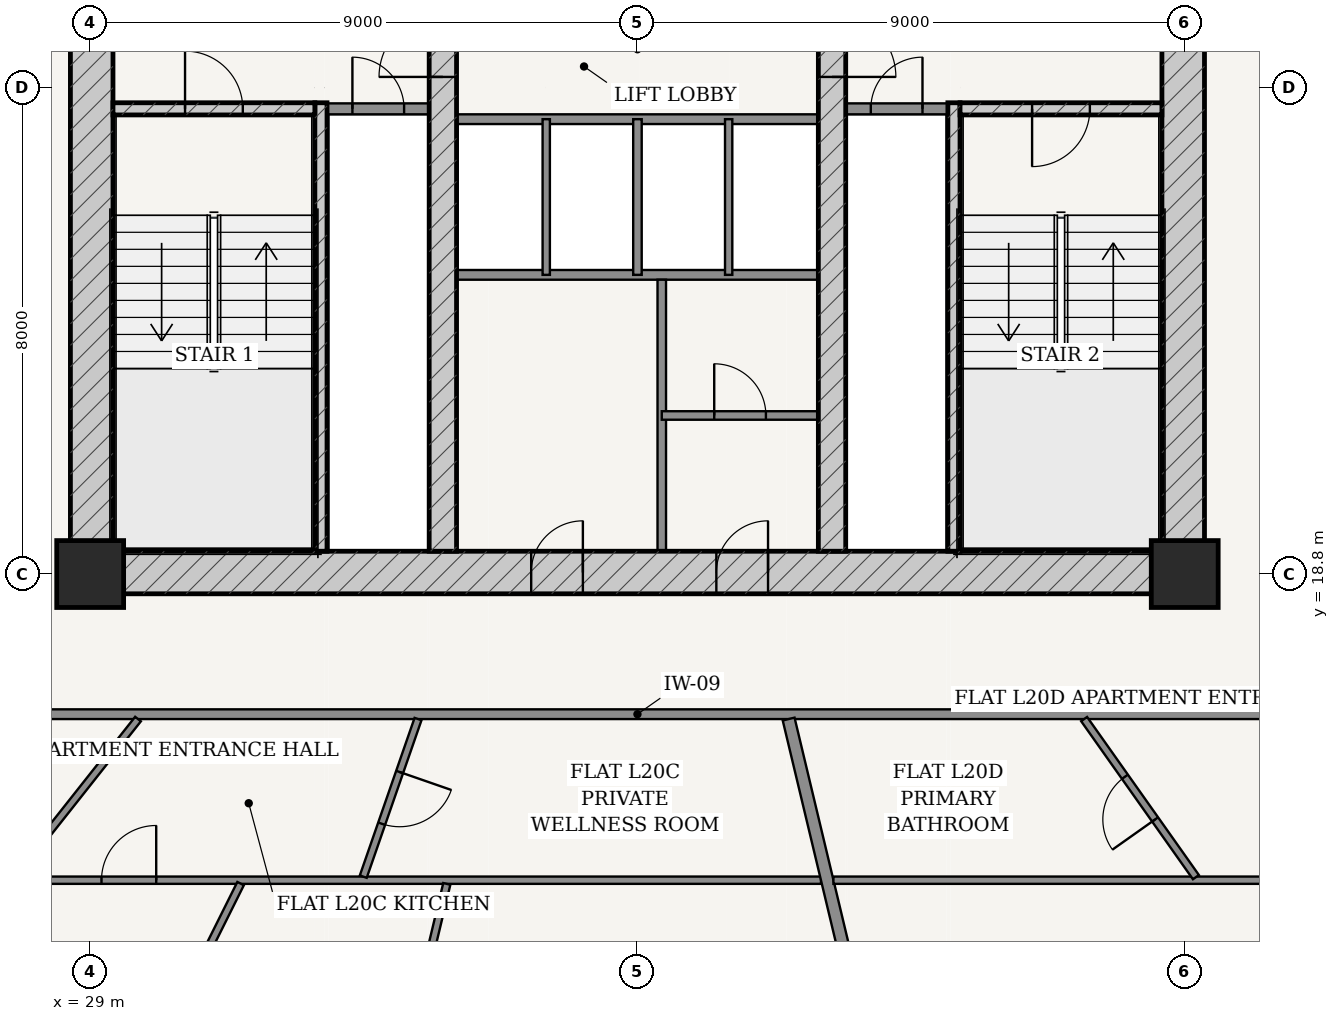
"""IFC4 building model, lengths in metres.
Left out: names, types, materials, properties, quantities, classifications, styles, units other than length and angle.
Written with IfcOpenShell. Run it as: python <this file> out.ifc"""

import sys

from ifc_helpers import new_model, si_unit, direction, frame, frame_2d, origin, origin_2d, place, context, subcontext, project, spatial, rectangle, extrude, source, transform, mapped, element, fill, save


model = new_model("IFC4")
c1 = context("Model", 3, precision=1e-05, world=origin(), true_north=direction((-0.2419218956, 0.970295726276)))
c2 = subcontext(c1, "Body", "Model", "MODEL_VIEW")
j1 = project(units=[si_unit("LENGTHUNIT", "METRE"), si_unit("PLANEANGLEUNIT", "RADIAN")], contexts=[c1])
p1 = place(None, origin())
s1 = spatial("IfcSite", under=j1, at=p1, CompositionType="ELEMENT")
p2 = place(p1, origin())
s2 = spatial("IfcBuilding", under=s1, at=p2, CompositionType="ELEMENT")
p3 = place(p2, frame((0.0, 0.0, 79.8)))
s3 = spatial("IfcBuildingStorey", under=s2, at=p3, CompositionType="ELEMENT", Elevation=79.8)
for number, where, z_axis, x_axis in (
    (1, (29.0, 18.8, 0.0), (0.0, 0.0, 1.0), (1.0, 0.0, 0.0)),
    (2, (47.0, 18.8, 0.0), (0.0, 0.0, 1.0), (1.0, 0.0, 0.0)),
):
    element("IfcColumn", number, at=place(p3, frame(where, z_axis=z_axis, x_axis=x_axis)), inside=s3, PredefinedType="COLUMN", context=c2, shape_type="SweptSolid", body=[
        extrude(rectangle(XDim=1.1, YDim=1.1, at=origin_2d()), origin(), (0.0, 0.0, 1.0), 3.6),
    ])
p4 = place(p3, frame((28.675, 18.825, 0.0), z_axis=(0.0, 0.0, 1.0), x_axis=(1.0, 0.0, 0.0)))
e3 = element("IfcWall", 3, at=p4, inside=s3, PredefinedType="SHEAR", context=c2, shape_type="SweptSolid", body=[
    extrude(rectangle(XDim=18.65, YDim=0.7, at=frame_2d((9.325, 0.0))), origin(), (0.0, 0.0, 1.0), 3.325),
])
p5 = place(p4, frame((7.577, 0.0, 0.0)))
e4 = element("IfcOpeningElement", 4, at=p5, cuts=e3, PredefinedType="OPENING", context=c2, shape_type="SweptSolid", body=[
    extrude(rectangle(XDim=0.85, YDim=2.1, at=frame_2d((0.425, 1.05))), frame((0.0, 0.36, 0.0), z_axis=(0.0, -1.0, 0.0), x_axis=(1.0, 0.0, 0.0)), (0.0, 0.0, 1.0), 0.72),
])
p6 = place(p4, frame((10.623, 0.0, 0.0)))
e5 = element("IfcOpeningElement", 5, at=p6, cuts=e3, PredefinedType="OPENING", context=c2, shape_type="SweptSolid", body=[
    extrude(rectangle(XDim=0.85, YDim=2.1, at=frame_2d((0.425, 1.05))), frame((0.0, 0.36, 0.0), z_axis=(0.0, -1.0, 0.0), x_axis=(1.0, 0.0, 0.0)), (0.0, 0.0, 1.0), 0.72),
])
p7 = place(p3, frame((29.025, 19.175, 0.0), z_axis=(0.0, 0.0, 1.0), x_axis=(0.0, 1.0, 0.0)))
e6 = element("IfcWall", 6, at=p7, inside=s3, PredefinedType="SHEAR", context=c2, shape_type="SweptSolid", body=[
    extrude(rectangle(XDim=15.25, YDim=0.7, at=frame_2d((7.625, 0.0))), origin(), (0.0, 0.0, 1.0), 3.325),
])
p8 = place(p7, frame((9.875, 0.0, 0.0)))
e7 = element("IfcOpeningElement", 7, at=p8, cuts=e6, PredefinedType="OPENING", context=c2, shape_type="SweptSolid", body=[
    extrude(rectangle(XDim=1.5, YDim=2.2, at=frame_2d((0.75, 1.1))), frame((0.0, 0.36, 0.0), z_axis=(0.0, -1.0, 0.0), x_axis=(1.0, 0.0, 0.0)), (0.0, 0.0, 1.0), 0.72),
])
p9 = place(p3, frame((46.975, 19.175, 0.0), z_axis=(0.0, 0.0, 1.0), x_axis=(0.0, 1.0, 0.0)))
e8 = element("IfcWall", 8, at=p9, inside=s3, PredefinedType="SHEAR", context=c2, shape_type="SweptSolid", body=[
    extrude(rectangle(XDim=15.25, YDim=0.7, at=frame_2d((7.625, 0.0))), origin(), (0.0, 0.0, 1.0), 3.325),
])
p10 = place(p9, frame((9.875, 0.0, 0.0)))
e9 = element("IfcOpeningElement", 9, at=p10, cuts=e8, PredefinedType="OPENING", context=c2, shape_type="SweptSolid", body=[
    extrude(rectangle(XDim=1.5, YDim=2.2, at=frame_2d((0.75, 1.1))), frame((0.0, 0.36, 0.0), z_axis=(0.0, -1.0, 0.0), x_axis=(1.0, 0.0, 0.0)), (0.0, 0.0, 1.0), 0.72),
])
p11 = place(p3, frame((32.795, 19.175, 0.0), z_axis=(0.0, 0.0, 1.0), x_axis=(0.0, 1.0, 0.0)))
e10 = element("IfcWall", 10, at=p11, inside=s3, PredefinedType="SOLIDWALL", context=c2, shape_type="SweptSolid", body=[
    extrude(rectangle(XDim=7.375, YDim=0.2, at=frame_2d((3.688, 0.0))), origin(), (0.0, 0.0, 1.0), 3.325),
])
p12 = place(p3, frame((29.375, 26.45, 0.0), z_axis=(0.0, 0.0, 1.0), x_axis=(1.0, 0.0, 0.0)))
e11 = element("IfcWall", 11, at=p12, inside=s3, PredefinedType="SOLIDWALL", context=c2, shape_type="SweptSolid", body=[
    extrude(rectangle(XDim=3.32, YDim=0.2, at=frame_2d((1.66, 0.0))), origin(), (0.0, 0.0, 1.0), 3.325),
])
p13 = place(p12, frame((1.185, 0.0, 0.0)))
e12 = element("IfcOpeningElement", 12, at=p13, cuts=e11, PredefinedType="OPENING", context=c2, shape_type="SweptSolid", body=[
    extrude(rectangle(XDim=0.95, YDim=2.15, at=frame_2d((0.475, 1.075))), frame((0.0, 0.11, 0.0), z_axis=(0.0, -1.0, 0.0), x_axis=(1.0, 0.0, 0.0)), (0.0, 0.0, 1.0), 0.22),
])
p14 = place(p3, frame((43.205, 19.175, 0.0), z_axis=(0.0, 0.0, 1.0), x_axis=(0.0, 1.0, 0.0)))
e13 = element("IfcWall", 13, at=p14, inside=s3, PredefinedType="SOLIDWALL", context=c2, shape_type="SweptSolid", body=[
    extrude(rectangle(XDim=7.375, YDim=0.2, at=frame_2d((3.688, 0.0))), origin(), (0.0, 0.0, 1.0), 3.325),
])
p15 = place(p3, frame((43.305, 26.45, 0.0), z_axis=(0.0, 0.0, 1.0), x_axis=(1.0, 0.0, 0.0)))
e14 = element("IfcWall", 14, at=p15, inside=s3, PredefinedType="SOLIDWALL", context=c2, shape_type="SweptSolid", body=[
    extrude(rectangle(XDim=3.32, YDim=0.2, at=frame_2d((1.66, 0.0))), origin(), (0.0, 0.0, 1.0), 3.325),
])
p16 = place(p15, frame((1.185, 0.0, 0.0)))
e15 = element("IfcOpeningElement", 15, at=p16, cuts=e14, PredefinedType="OPENING", context=c2, shape_type="SweptSolid", body=[
    extrude(rectangle(XDim=0.95, YDim=2.15, at=frame_2d((0.475, 1.075))), frame((0.0, 0.11, 0.0), z_axis=(0.0, -1.0, 0.0), x_axis=(1.0, 0.0, 0.0)), (0.0, 0.0, 1.0), 0.22),
])
p17 = place(p3, frame((34.8, 19.175, 0.0), z_axis=(0.0, 0.0, 1.0), x_axis=(0.0, 1.0, 0.0)))
e16 = element("IfcWall", 16, at=p17, inside=s3, PredefinedType="SHEAR", context=c2, shape_type="SweptSolid", body=[
    extrude(rectangle(XDim=15.25, YDim=0.45, at=frame_2d((7.625, 0.0))), origin(), (0.0, 0.0, 1.0), 3.325),
])
p18 = place(p17, frame((7.8, 0.0, 0.0)))
e17 = element("IfcOpeningElement", 17, at=p18, cuts=e16, PredefinedType="OPENING", context=c2, shape_type="SweptSolid", body=[
    extrude(rectangle(XDim=1.05, YDim=2.15, at=frame_2d((0.525, 1.075))), frame((0.0, 0.235, 0.0), z_axis=(0.0, -1.0, 0.0), x_axis=(1.0, 0.0, 0.0)), (0.0, 0.0, 1.0), 0.47),
])
p19 = place(p3, frame((41.2, 19.175, 0.0), z_axis=(0.0, 0.0, 1.0), x_axis=(0.0, 1.0, 0.0)))
e18 = element("IfcWall", 18, at=p19, inside=s3, PredefinedType="SHEAR", context=c2, shape_type="SweptSolid", body=[
    extrude(rectangle(XDim=15.25, YDim=0.45, at=frame_2d((7.625, 0.0))), origin(), (0.0, 0.0, 1.0), 3.325),
])
p20 = place(p19, frame((7.8, 0.0, 0.0)))
e19 = element("IfcOpeningElement", 19, at=p20, cuts=e18, PredefinedType="OPENING", context=c2, shape_type="SweptSolid", body=[
    extrude(rectangle(XDim=1.05, YDim=2.15, at=frame_2d((0.525, 1.075))), frame((0.0, 0.235, 0.0), z_axis=(0.0, -1.0, 0.0), x_axis=(1.0, 0.0, 0.0)), (0.0, 0.0, 1.0), 0.47),
])
p21 = place(p3, frame((32.9, 26.45, 0.0), z_axis=(0.0, 0.0, 1.0), x_axis=(1.0, 0.0, 0.0)))
e20 = element("IfcWall", 20, at=p21, inside=s3, PredefinedType="PARTITIONING", context=c2, shape_type="SweptSolid", body=[
    extrude(rectangle(XDim=1.675, YDim=0.18, at=frame_2d((0.837, 0.0))), origin(), (0.0, 0.0, 1.0), 3.325),
])
p22 = place(p21, frame((0.413, 0.0, 0.0)))
e21 = element("IfcOpeningElement", 21, at=p22, cuts=e20, PredefinedType="OPENING", context=c2, shape_type="SweptSolid", body=[
    extrude(rectangle(XDim=0.85, YDim=2.1, at=frame_2d((0.425, 1.05))), frame((0.0, 0.1, 0.0), z_axis=(0.0, -1.0, 0.0), x_axis=(1.0, 0.0, 0.0)), (0.0, 0.0, 1.0), 0.2),
])
p23 = place(p3, frame((41.425, 26.45, 0.0), z_axis=(0.0, 0.0, 1.0), x_axis=(1.0, 0.0, 0.0)))
e22 = element("IfcWall", 22, at=p23, inside=s3, PredefinedType="PARTITIONING", context=c2, shape_type="SweptSolid", body=[
    extrude(rectangle(XDim=1.675, YDim=0.18, at=frame_2d((0.837, 0.0))), origin(), (0.0, 0.0, 1.0), 3.325),
])
p24 = place(p23, frame((0.413, 0.0, 0.0)))
e23 = element("IfcOpeningElement", 23, at=p24, cuts=e22, PredefinedType="OPENING", context=c2, shape_type="SweptSolid", body=[
    extrude(rectangle(XDim=0.85, YDim=2.1, at=frame_2d((0.425, 1.05))), frame((0.0, 0.1, 0.0), z_axis=(0.0, -1.0, 0.0), x_axis=(1.0, 0.0, 0.0)), (0.0, 0.0, 1.0), 0.2),
])
for number, where, z_axis, x_axis in (
    (24, (35.025, 26.28, 0.0), (0.0, 0.0, 1.0), (1.0, 0.0, 0.0)),
    (25, (35.025, 23.72, 0.0), (0.0, 0.0, 1.0), (1.0, 0.0, 0.0)),
):
    element("IfcWall", number, at=place(p3, frame(where, z_axis=z_axis, x_axis=x_axis)), inside=s3, PredefinedType="PARTITIONING", context=c2, shape_type="SweptSolid", body=[
        extrude(rectangle(XDim=5.95, YDim=0.16, at=frame_2d((2.975, 0.0))), origin(), (0.0, 0.0, 1.0), 3.325),
    ])
p25 = place(p3, frame((36.5, 23.72, 0.0), z_axis=(0.0, 0.0, 1.0), x_axis=(0.0, 1.0, 0.0)))
e26 = element("IfcWall", 26, at=p25, inside=s3, PredefinedType="PARTITIONING", context=c2, shape_type="SweptSolid", body=[
    extrude(rectangle(XDim=2.56, YDim=0.12, at=frame_2d((1.28, 0.0))), origin(), (0.0, 0.0, 1.0), 3.325),
])
p26 = place(p3, frame((38.0, 23.72, 0.0), z_axis=(0.0, 0.0, 1.0), x_axis=(0.0, 1.0, 0.0)))
e27 = element("IfcWall", 27, at=p26, inside=s3, PredefinedType="PARTITIONING", context=c2, shape_type="SweptSolid", body=[
    extrude(rectangle(XDim=2.56, YDim=0.14, at=frame_2d((1.28, 0.0))), origin(), (0.0, 0.0, 1.0), 3.325),
])
p27 = place(p3, frame((39.5, 23.72, 0.0), z_axis=(0.0, 0.0, 1.0), x_axis=(0.0, 1.0, 0.0)))
e28 = element("IfcWall", 28, at=p27, inside=s3, PredefinedType="PARTITIONING", context=c2, shape_type="SweptSolid", body=[
    extrude(rectangle(XDim=2.56, YDim=0.12, at=frame_2d((1.28, 0.0))), origin(), (0.0, 0.0, 1.0), 3.325),
])
p28 = place(p3, frame((38.4, 19.175, 0.0), z_axis=(0.0, 0.0, 1.0), x_axis=(0.0, 1.0, 0.0)))
e29 = element("IfcWall", 29, at=p28, inside=s3, PredefinedType="PARTITIONING", context=c2, shape_type="SweptSolid", body=[
    extrude(rectangle(XDim=4.465, YDim=0.14, at=frame_2d((2.232, 0.0))), origin(), (0.0, 0.0, 1.0), 3.325),
])
p29 = place(p3, frame((38.4, 21.407, 0.0), z_axis=(0.0, 0.0, 1.0), x_axis=(1.0, 0.0, 0.0)))
e30 = element("IfcWall", 30, at=p29, inside=s3, PredefinedType="PARTITIONING", context=c2, shape_type="SweptSolid", body=[
    extrude(rectangle(XDim=2.575, YDim=0.14, at=frame_2d((1.288, 0.0))), origin(), (0.0, 0.0, 1.0), 3.325),
])
p30 = place(p29, frame((0.863, 0.0, 0.0)))
e31 = element("IfcOpeningElement", 31, at=p30, cuts=e30, PredefinedType="OPENING", context=c2, shape_type="SweptSolid", body=[
    extrude(rectangle(XDim=0.85, YDim=2.1, at=frame_2d((0.425, 1.05))), frame((0.0, 0.08, 0.0), z_axis=(0.0, -1.0, 0.0), x_axis=(1.0, 0.0, 0.0)), (0.0, 0.0, 1.0), 0.16),
])
p31 = place(p3, frame((26.695, 16.495, 0.0), z_axis=(0.0, 0.0, 1.0), x_axis=(1.0, 0.0, 0.0)))
e32 = element("IfcWall", 32, at=p31, inside=s3, PredefinedType="PARTITIONING", context=c2, shape_type="SweptSolid", body=[
    extrude(rectangle(XDim=22.61, YDim=0.16, at=frame_2d((11.305, 0.0))), origin(), (0.0, 0.0, 1.0), 2.767),
])
p32 = place(p3, frame((41.019, 13.765, 0.0), z_axis=(0.0, 0.0, 1.0), x_axis=(-1.0, 0.0, 0.0)))
e33 = element("IfcWall", 33, at=p32, inside=s3, PredefinedType="PARTITIONING", context=c2, shape_type="SweptSolid", body=[
    extrude(rectangle(XDim=17.054, YDim=0.12, at=frame_2d((8.527, 0.0))), origin(), (0.0, 0.0, 1.0), 2.767),
])
p33 = place(p32, frame((10.933, 0.0, 0.0)))
e34 = element("IfcOpeningElement", 34, at=p33, cuts=e33, PredefinedType="OPENING", context=c2, shape_type="SweptSolid", body=[
    extrude(rectangle(XDim=0.9, YDim=2.15, at=frame_2d((0.45, 1.075))), frame((0.0, 0.07, 0.0), z_axis=(0.0, -1.0, 0.0), x_axis=(1.0, 0.0, 0.0)), (0.0, 0.0, 1.0), 0.14),
])
p34 = place(p3, frame((31.474, 13.709, 0.0), z_axis=(0.0, 0.0, 1.0), x_axis=(-0.446179583353, -0.894943450392, 0.0)))
e35 = element("IfcWall", 35, at=p34, inside=s3, PredefinedType="PARTITIONING", context=c2, shape_type="SweptSolid", body=[
    extrude(rectangle(XDim=8.125, YDim=0.12, at=frame_2d((4.062, 0.0))), origin(), (0.0, 0.0, 1.0), 2.767),
])
p35 = place(p34, frame((3.612, 0.0, 0.0)))
e36 = element("IfcOpeningElement", 36, at=p35, cuts=e35, PredefinedType="OPENING", context=c2, shape_type="SweptSolid", body=[
    extrude(rectangle(XDim=0.9, YDim=2.15, at=frame_2d((0.45, 1.075))), frame((0.0, 0.07, 0.0), z_axis=(0.0, -1.0, 0.0), x_axis=(1.0, 0.0, 0.0)), (0.0, 0.0, 1.0), 0.14),
])
p36 = place(p3, frame((34.865, 13.705, 0.0), z_axis=(0.0, 0.0, 1.0), x_axis=(-0.23282725047, -0.97251810854, 0.0)))
e37 = element("IfcWall", 37, at=p36, inside=s3, PredefinedType="PARTITIONING", context=c2, shape_type="SweptSolid", body=[
    extrude(rectangle(XDim=8.715, YDim=0.12, at=frame_2d((4.357, 0.0))), origin(), (0.0, 0.0, 1.0), 2.767),
])
p37 = place(p36, frame((2.831, 0.0, 0.0)))
e38 = element("IfcOpeningElement", 38, at=p37, cuts=e37, PredefinedType="OPENING", context=c2, shape_type="SweptSolid", body=[
    extrude(rectangle(XDim=0.9, YDim=2.15, at=frame_2d((0.45, 1.075))), frame((0.0, 0.07, 0.0), z_axis=(0.0, -1.0, 0.0), x_axis=(1.0, 0.0, 0.0)), (0.0, 0.0, 1.0), 0.14),
])
p38 = place(p3, frame((29.787, 16.415, 0.0), z_axis=(0.0, 0.0, 1.0), x_axis=(-0.62033143471, -0.784339793145, 0.0)))
e39 = element("IfcWall", 39, at=p38, inside=s3, PredefinedType="PARTITIONING", context=c2, shape_type="SweptSolid", body=[
    extrude(rectangle(XDim=3.317, YDim=0.12, at=frame_2d((1.658, 0.0))), origin(), (0.0, 0.0, 1.0), 3.004),
])
p39 = place(p3, frame((34.392, 16.415, 0.0), z_axis=(0.0, 0.0, 1.0), x_axis=(-0.328268661855, -0.94458439837, 0.0)))
e40 = element("IfcWall", 40, at=p39, inside=s3, PredefinedType="PARTITIONING", context=c2, shape_type="SweptSolid", body=[
    extrude(rectangle(XDim=2.744, YDim=0.12, at=frame_2d((1.372, 0.0))), origin(), (0.0, 0.0, 1.0), 3.325),
])
p40 = place(p39, frame((0.922, 0.0, 0.0)))
e41 = element("IfcOpeningElement", 41, at=p40, cuts=e40, PredefinedType="OPENING", context=c2, shape_type="SweptSolid", body=[
    extrude(rectangle(XDim=0.9, YDim=2.15, at=frame_2d((0.45, 1.075))), frame((0.0, 0.07, 0.0), z_axis=(0.0, -1.0, 0.0), x_axis=(1.0, 0.0, 0.0)), (0.0, 0.0, 1.0), 0.14),
])
p41 = place(p3, frame((40.486, 16.415, 0.0), z_axis=(0.0, 0.0, 1.0), x_axis=(0.232829417917, -0.972517589636, 0.0)))
e42 = element("IfcWall", 42, at=p41, inside=s3, PredefinedType="PARTITIONING", context=c2, shape_type="SweptSolid", body=[
    extrude(rectangle(XDim=11.502, YDim=0.2, at=frame_2d((5.751, 0.0))), origin(), (0.0, 0.0, 1.0), 2.767),
])
p42 = place(p3, frame((52.035, 13.765, 0.0), z_axis=(0.0, 0.0, 1.0), x_axis=(-1.0, 0.0, 0.0)))
e43 = element("IfcWall", 43, at=p42, inside=s3, PredefinedType="PARTITIONING", context=c2, shape_type="SweptSolid", body=[
    extrude(rectangle(XDim=10.812, YDim=0.12, at=frame_2d((5.406, 0.0))), origin(), (0.0, 0.0, 1.0), 2.767),
])
p43 = place(p42, frame((2.145, 0.0, 0.0)))
e44 = element("IfcOpeningElement", 44, at=p43, cuts=e43, PredefinedType="OPENING", context=c2, shape_type="SweptSolid", body=[
    extrude(rectangle(XDim=0.9, YDim=2.15, at=frame_2d((0.45, 1.075))), frame((0.0, 0.07, 0.0), z_axis=(0.0, -1.0, 0.0), x_axis=(1.0, 0.0, 0.0)), (0.0, 0.0, 1.0), 0.14),
])
p44 = place(p3, frame((45.345, 16.415, 0.0), z_axis=(0.0, 0.0, 1.0), x_axis=(0.577474693199, -0.816408585645, 0.0)))
e45 = element("IfcWall", 45, at=p44, inside=s3, PredefinedType="PARTITIONING", context=c2, shape_type="SweptSolid", body=[
    extrude(rectangle(XDim=3.184, YDim=0.12, at=frame_2d((1.592, 0.0))), origin(), (0.0, 0.0, 1.0), 3.004),
])
p45 = place(p44, frame((1.162, 0.0, 0.0)))
e46 = element("IfcOpeningElement", 46, at=p45, cuts=e45, PredefinedType="OPENING", context=c2, shape_type="SweptSolid", body=[
    extrude(rectangle(XDim=0.86, YDim=2.15, at=frame_2d((0.43, 1.075))), frame((0.0, 0.07, 0.0), z_axis=(0.0, -1.0, 0.0), x_axis=(1.0, 0.0, 0.0)), (0.0, 0.0, 1.0), 0.14),
])
m1 = source(origin(), c2, "Body", "SweptSolid", [
    extrude(rectangle(XDim=1.05, YDim=2.15, at=frame_2d((0.525, 1.075))), frame((0.0, 0.025, 0.0), z_axis=(0.0, -1.0, 0.0), x_axis=(1.0, 0.0, 0.0)), (0.0, 0.0, 1.0), 0.05),
])
p46 = place(p18, origin())
e47 = element("IfcDoor", 47, at=p46, inside=s3, OperationType="SINGLE_SWING_LEFT", PredefinedType="DOOR", context=c2, shape_type="MappedRepresentation", body=[
    mapped(m1, transform((0.0, 0.0, 0.0), scale=1.0)),
])
fill(e17, e47)
p47 = place(p20, frame((1.05, 0.0, 0.0), z_axis=(0.0, 0.0, 1.0), x_axis=(-1.0, 0.0, 0.0)))
e48 = element("IfcDoor", 48, at=p47, inside=s3, OperationType="SINGLE_SWING_RIGHT", PredefinedType="DOOR", context=c2, shape_type="MappedRepresentation", body=[
    mapped(m1, transform((0.0, 0.0, 0.0), scale=1.0)),
])
fill(e19, e48)
m2 = source(origin(), c2, "Body", "SweptSolid", [
    extrude(rectangle(XDim=0.95, YDim=2.15, at=frame_2d((0.475, 1.075))), frame((0.0, 0.025, 0.0), z_axis=(0.0, -1.0, 0.0), x_axis=(1.0, 0.0, 0.0)), (0.0, 0.0, 1.0), 0.05),
])
p48 = place(p13, origin())
e49 = element("IfcDoor", 49, at=p48, inside=s3, OperationType="SINGLE_SWING_LEFT", PredefinedType="DOOR", context=c2, shape_type="MappedRepresentation", body=[
    mapped(m2, transform((0.0, 0.0, 0.0), scale=1.0)),
])
fill(e12, e49)
p49 = place(p16, frame((0.95, 0.0, 0.0), z_axis=(0.0, 0.0, 1.0), x_axis=(-1.0, 0.0, 0.0)))
e50 = element("IfcDoor", 50, at=p49, inside=s3, OperationType="SINGLE_SWING_RIGHT", PredefinedType="DOOR", context=c2, shape_type="MappedRepresentation", body=[
    mapped(m2, transform((0.0, 0.0, 0.0), scale=1.0)),
])
fill(e15, e50)
m3 = source(origin(), c2, "Body", "SweptSolid", [
    extrude(rectangle(XDim=0.85, YDim=2.1, at=frame_2d((0.425, 1.05))), frame((0.0, 0.025, 0.0), z_axis=(0.0, -1.0, 0.0), x_axis=(1.0, 0.0, 0.0)), (0.0, 0.0, 1.0), 0.05),
])
p50 = place(p22, origin())
e51 = element("IfcDoor", 51, at=p50, inside=s3, OperationType="SINGLE_SWING_LEFT", PredefinedType="DOOR", context=c2, shape_type="MappedRepresentation", body=[
    mapped(m3, transform((0.0, 0.0, 0.0), scale=1.0)),
])
fill(e21, e51)
p51 = place(p24, origin())
e52 = element("IfcDoor", 52, at=p51, inside=s3, OperationType="SINGLE_SWING_RIGHT", PredefinedType="DOOR", context=c2, shape_type="MappedRepresentation", body=[
    mapped(m3, transform((0.0, 0.0, 0.0), scale=1.0)),
])
fill(e23, e52)
p52 = place(p5, origin())
e53 = element("IfcDoor", 53, at=p52, inside=s3, OperationType="SINGLE_SWING_RIGHT", PredefinedType="DOOR", context=c2, shape_type="MappedRepresentation", body=[
    mapped(m3, transform((0.0, 0.0, 0.0), scale=1.0)),
])
fill(e4, e53)
p53 = place(p6, origin())
e54 = element("IfcDoor", 54, at=p53, inside=s3, OperationType="SINGLE_SWING_RIGHT", PredefinedType="DOOR", context=c2, shape_type="MappedRepresentation", body=[
    mapped(m3, transform((0.0, 0.0, 0.0), scale=1.0)),
])
fill(e5, e54)
p54 = place(p30, origin())
e55 = element("IfcDoor", 55, at=p54, inside=s3, OperationType="SINGLE_SWING_LEFT", PredefinedType="DOOR", context=c2, shape_type="MappedRepresentation", body=[
    mapped(m3, transform((0.0, 0.0, 0.0), scale=1.0)),
])
fill(e31, e55)
m4 = source(origin(), c2, "Body", "SweptSolid", [
    extrude(rectangle(XDim=0.9, YDim=2.15, at=frame_2d((0.45, 1.075))), frame((0.0, 0.025, 0.0), z_axis=(0.0, -1.0, 0.0), x_axis=(1.0, 0.0, 0.0)), (0.0, 0.0, 1.0), 0.05),
])
p55 = place(p33, frame((0.9, 0.0, 0.0), z_axis=(0.0, 0.0, 1.0), x_axis=(-1.0, 0.0, 0.0)))
e56 = element("IfcDoor", 56, at=p55, inside=s3, OperationType="SINGLE_SWING_RIGHT", PredefinedType="DOOR", context=c2, shape_type="MappedRepresentation", body=[
    mapped(m4, transform((0.0, 0.0, 0.0), scale=1.0)),
])
fill(e34, e56)
p56 = place(p40, origin())
e57 = element("IfcDoor", 57, at=p56, inside=s3, OperationType="SINGLE_SWING_LEFT", PredefinedType="DOOR", context=c2, shape_type="MappedRepresentation", body=[
    mapped(m4, transform((0.0, 0.0, 0.0), scale=1.0)),
])
fill(e41, e57)
m5 = source(origin(), c2, "Body", "SweptSolid", [
    extrude(rectangle(XDim=0.86, YDim=2.15, at=frame_2d((0.43, 1.075))), frame((0.0, 0.025, 0.0), z_axis=(0.0, -1.0, 0.0), x_axis=(1.0, 0.0, 0.0)), (0.0, 0.0, 1.0), 0.05),
])
p57 = place(p45, frame((0.86, 0.0, 0.0), z_axis=(0.0, 0.0, 1.0), x_axis=(-1.0, 0.0, 0.0)))
e58 = element("IfcDoor", 58, at=p57, inside=s3, OperationType="SINGLE_SWING_LEFT", PredefinedType="DOOR", context=c2, shape_type="MappedRepresentation", body=[
    mapped(m5, transform((0.0, 0.0, 0.0), scale=1.0)),
])
fill(e46, e58)
save(model, sys.argv[1])
